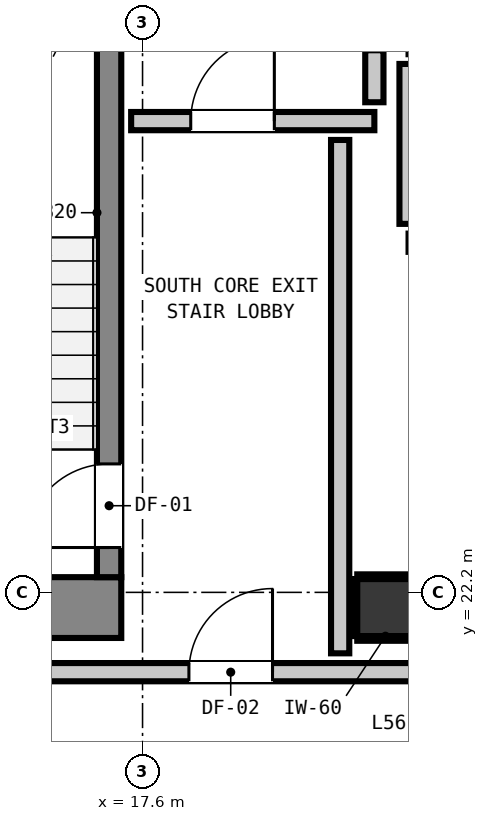
"""IFC4 building model, lengths in metres.
Left out: names, types, materials, properties, quantities, classifications, styles, units other than length and angle.
Written with IfcOpenShell. Run it as: python <this file> out.ifc"""

import sys

from ifc_helpers import new_model, si_unit, direction, frame, frame_2d, origin, origin_2d, place, context, subcontext, project, spatial, rectangle, extrude, element, fill, save


model = new_model("IFC4")
c1 = context("Model", 3, precision=1e-05, world=origin(), true_north=direction((0.0, 1.0)))
c2 = subcontext(c1, "Body", "Model", "MODEL_VIEW")
j1 = project(units=[si_unit("LENGTHUNIT", "METRE"), si_unit("PLANEANGLEUNIT", "RADIAN")], contexts=[c1])
p1 = place(None, origin())
s1 = spatial("IfcSite", under=j1, at=p1, CompositionType="ELEMENT")
p2 = place(p1, origin())
s2 = spatial("IfcBuilding", under=s1, at=p2, CompositionType="ELEMENT")
p3 = place(p2, frame((0.0, 0.0, 193.48)))
s3 = spatial("IfcBuildingStorey", under=s2, at=p3, CompositionType="ELEMENT", Elevation=193.48)
p4 = place(p3, frame((20.8, 22.0, 0.0), z_axis=(0.0, 0.0, 1.0), x_axis=(1.0, 0.0, 0.0)))
e1 = element("IfcColumn", 1, at=p4, inside=s3, PredefinedType="COLUMN", context=c2, shape_type="SweptSolid", body=[
    extrude(rectangle(XDim=0.75, YDim=0.75, at=origin_2d()), origin(), (0.0, 0.0, 1.0), 3.32),
])
p5 = place(p3, frame((13.24, 22.0, 0.0), z_axis=(0.0, 0.0, 1.0), x_axis=(1.0, 0.0, 0.0)))
e2 = element("IfcWall", 2, at=p5, inside=s3, PredefinedType="SHEAR", context=c2, shape_type="SweptSolid", body=[
    extrude(rectangle(XDim=4.08, YDim=0.8, at=frame_2d((2.04, 0.0))), origin(), (0.0, 0.0, 1.0), 3.32),
])
p6 = place(p3, frame((17.16, 22.4, 0.0), z_axis=(0.0, 0.0, 1.0), x_axis=(0.0, 1.0, 0.0)))
e3 = element("IfcWall", 3, at=p6, inside=s3, PredefinedType="SHEAR", context=c2, shape_type="SweptSolid", body=[
    extrude(rectangle(XDim=8.0, YDim=0.32, at=frame_2d((4.0, 0.0))), origin(), (0.0, 0.0, 1.0), 3.32),
])
p7 = place(p6, frame((0.39, 0.0, 0.0)))
e4 = element("IfcOpeningElement", 4, at=p7, cuts=e3, PredefinedType="OPENING", context=c2, shape_type="SweptSolid", body=[
    extrude(rectangle(XDim=1.1, YDim=2.15, at=frame_2d((0.55, 1.075))), frame((0.0, 0.17, 0.0), z_axis=(0.0, -1.0, 0.0), x_axis=(1.0, 0.0, 0.0)), (0.0, 0.0, 1.0), 0.34),
])
for number, where, z_axis, x_axis in (
    (5, (21.1, 26.8, 0.0), (0.0, 0.0, 1.0), (1.0, 0.0, 0.0)),
    (6, (21.1, 29.4, 0.0), (0.0, 0.0, 1.0), (1.0, 0.0, 0.0)),
):
    element("IfcWall", number, at=place(p3, frame(where, z_axis=z_axis, x_axis=x_axis)), inside=s3, PredefinedType="PARTITIONING", context=c2, shape_type="SweptSolid", body=[
        extrude(rectangle(XDim=2.2, YDim=0.24, at=frame_2d((1.1, 0.0))), origin(), (0.0, 0.0, 1.0), 3.1),
    ])
p8 = place(p3, frame((21.1, 27.048, 0.0), z_axis=(0.0, 0.0, 1.0), x_axis=(0.0, 1.0, 0.0)))
e7 = element("IfcWall", 7, at=p8, inside=s3, PredefinedType="PARTITIONING", context=c2, shape_type="SweptSolid", body=[
    extrude(rectangle(XDim=2.104, YDim=0.24, at=frame_2d((1.052, 0.0))), origin(), (0.0, 0.0, 1.0), 2.335),
])
p9 = place(p3, frame((4.587, 21.15, 0.0), z_axis=(0.0, 0.0, 1.0), x_axis=(1.0, 0.0, 0.0)))
e8 = element("IfcWall", 8, at=p9, inside=s3, PredefinedType="PARTITIONING", context=c2, shape_type="SweptSolid", body=[
    extrude(rectangle(XDim=36.626, YDim=0.24, at=frame_2d((18.313, 0.0))), origin(), (0.0, 0.0, 1.0), 3.1),
])
p10 = place(p9, frame((13.623, 0.0, 0.0)))
e9 = element("IfcOpeningElement", 9, at=p10, cuts=e8, PredefinedType="OPENING", context=c2, shape_type="SweptSolid", body=[
    extrude(rectangle(XDim=1.1, YDim=2.15, at=frame_2d((0.55, 1.075))), frame((0.0, 0.13, 0.0), z_axis=(0.0, -1.0, 0.0), x_axis=(1.0, 0.0, 0.0)), (0.0, 0.0, 1.0), 0.26),
])
p11 = place(p9, frame((4.723, 0.0, 0.0)))
e10 = element("IfcOpeningElement", 10, at=p11, cuts=e8, PredefinedType="OPENING", context=c2, shape_type="SweptSolid", body=[
    extrude(rectangle(XDim=1.0, YDim=2.15, at=frame_2d((0.5, 1.075))), frame((0.0, 0.13, 0.0), z_axis=(0.0, -1.0, 0.0), x_axis=(1.0, 0.0, 0.0)), (0.0, 0.0, 1.0), 0.26),
])
p12 = place(p3, frame((17.45, 28.4, 0.0), z_axis=(0.0, 0.0, 1.0), x_axis=(1.0, 0.0, 0.0)))
e11 = element("IfcWall", 11, at=p12, inside=s3, PredefinedType="PARTITIONING", context=c2, shape_type="SweptSolid", body=[
    extrude(rectangle(XDim=3.2, YDim=0.24, at=frame_2d((1.6, 0.0))), origin(), (0.0, 0.0, 1.0), 3.1),
])
p13 = place(p12, frame((0.784, 0.0, 0.0)))
e12 = element("IfcOpeningElement", 12, at=p13, cuts=e11, PredefinedType="OPENING", context=c2, shape_type="SweptSolid", body=[
    extrude(rectangle(XDim=1.1, YDim=2.15, at=frame_2d((0.55, 1.075))), frame((0.0, 0.13, 0.0), z_axis=(0.0, -1.0, 0.0), x_axis=(1.0, 0.0, 0.0)), (0.0, 0.0, 1.0), 0.26),
])
p14 = place(p3, frame((20.2, 21.398, 0.0), z_axis=(0.0, 0.0, 1.0), x_axis=(0.0, 1.0, 0.0)))
e13 = element("IfcWall", 13, at=p14, inside=s3, PredefinedType="PARTITIONING", context=c2, shape_type="SweptSolid", body=[
    extrude(rectangle(XDim=6.754, YDim=0.24, at=frame_2d((3.377, 0.0))), origin(), (0.0, 0.0, 1.0), 3.1),
])
p15 = place(p3, frame((20.65, 28.648, 0.0), z_axis=(0.0, 0.0, 1.0), x_axis=(0.0, 1.0, 0.0)))
e14 = element("IfcWall", 14, at=p15, inside=s3, PredefinedType="PARTITIONING", context=c2, shape_type="SweptSolid", body=[
    extrude(rectangle(XDim=0.684, YDim=0.24, at=frame_2d((0.342, 0.0))), origin(), (0.0, 0.0, 1.0), 2.335),
])
for number, where, z_axis, x_axis in (
    (15, (20.425, 21.593, 0.0), (0.0, 0.0, 1.0), (1.0, 0.0, 0.0)),
    (16, (20.425, 22.407, 0.0), (0.0, 0.0, 1.0), (1.0, 0.0, 0.0)),
):
    element("IfcWall", number, at=place(p3, frame(where, z_axis=z_axis, x_axis=x_axis)), inside=s3, PredefinedType="PARTITIONING", context=c2, shape_type="SweptSolid", body=[
        extrude(rectangle(XDim=0.742, YDim=0.06, at=frame_2d((0.371, 0.0))), origin(), (0.0, 0.0, 1.0), 1.45),
    ])
p16 = place(p3, frame((20.393, 21.625, 0.0), z_axis=(0.0, 0.0, 1.0), x_axis=(0.0, 1.0, 0.0)))
e17 = element("IfcWall", 17, at=p16, inside=s3, PredefinedType="PARTITIONING", context=c2, shape_type="SweptSolid", body=[
    extrude(rectangle(XDim=0.75, YDim=0.06, at=frame_2d((0.375, 0.0))), origin(), (0.0, 0.0, 1.0), 1.45),
])
p17 = place(p7, origin())
e18 = element("IfcDoor", 18, at=p17, inside=s3, OperationType="SINGLE_SWING_LEFT", PredefinedType="DOOR", context=c2, shape_type="SweptSolid", body=[
    extrude(rectangle(XDim=1.1, YDim=2.15, at=frame_2d((0.55, 1.075))), frame((0.0, 0.025, 0.0), z_axis=(0.0, -1.0, 0.0), x_axis=(1.0, 0.0, 0.0)), (0.0, 0.0, 1.0), 0.05),
])
fill(e4, e18)
p18 = place(p13, origin())
e19 = element("IfcDoor", 19, at=p18, inside=s3, OperationType="SINGLE_SWING_RIGHT", PredefinedType="DOOR", context=c2, shape_type="SweptSolid", body=[
    extrude(rectangle(XDim=1.1, YDim=2.15, at=frame_2d((0.55, 1.075))), frame((0.0, 0.025, 0.0), z_axis=(0.0, -1.0, 0.0), x_axis=(1.0, 0.0, 0.0)), (0.0, 0.0, 1.0), 0.05),
])
fill(e12, e19)
p19 = place(p10, origin())
e20 = element("IfcDoor", 20, at=p19, inside=s3, OperationType="SINGLE_SWING_RIGHT", PredefinedType="DOOR", context=c2, shape_type="SweptSolid", body=[
    extrude(rectangle(XDim=1.1, YDim=2.15, at=frame_2d((0.55, 1.075))), frame((0.0, 0.025, 0.0), z_axis=(0.0, -1.0, 0.0), x_axis=(1.0, 0.0, 0.0)), (0.0, 0.0, 1.0), 0.05),
])
fill(e9, e20)
save(model, sys.argv[1])
